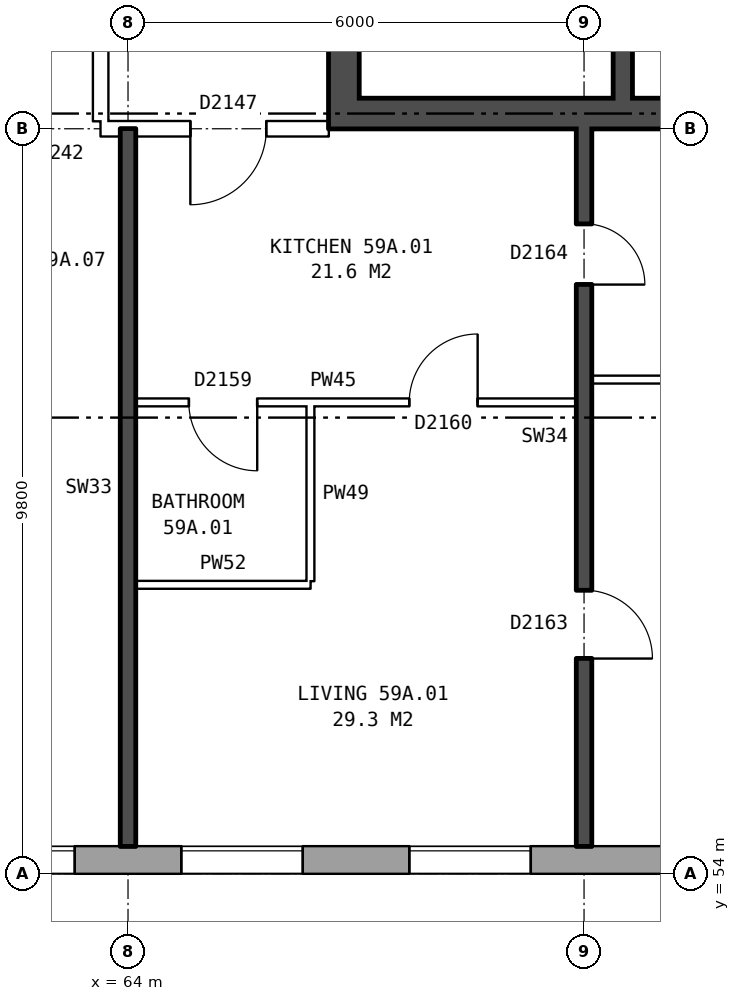
"""IFC4 building model, lengths in metres.
Left out: names, types, materials, properties, quantities, classifications, styles, units other than length and angle.
Written with IfcOpenShell. Run it as: python <this file> out.ifc"""

import sys

from ifc_helpers import new_model, si_unit, direction, frame, frame_2d, origin, place, context, subcontext, project, spatial, rectangle, extrude, element, fill, save


model = new_model("IFC4")
c1 = context("Model", 3, precision=1e-05, world=origin(), true_north=direction((0.0, 1.0)))
c2 = subcontext(c1, "Body", "Model", "MODEL_VIEW")
j1 = project(units=[si_unit("LENGTHUNIT", "METRE"), si_unit("PLANEANGLEUNIT", "RADIAN")], contexts=[c1])
p1 = place(None, origin())
s1 = spatial("IfcSite", under=j1, at=p1, CompositionType="ELEMENT")
p2 = place(p1, origin())
s2 = spatial("IfcBuilding", under=s1, at=p2, CompositionType="ELEMENT")
p3 = place(p2, frame((0.0, 0.0, 209.0)))
s3 = spatial("IfcBuildingStorey", under=s2, at=p3, CompositionType="ELEMENT", Elevation=209.0)
p4 = place(p3, frame((35.075, 54.18, 0.0), z_axis=(0.0, 0.0, 1.0), x_axis=(1.0, 0.0, 0.0)))
e1 = element("IfcWall", 1, at=p4, inside=s3, PredefinedType="STANDARD", context=c2, shape_type="SweptSolid", body=[
    extrude(rectangle(XDim=39.875, YDim=0.36, at=frame_2d((19.938, 0.0))), origin(), (0.0, 0.0, 1.0), 2.85),
])
p5 = place(p4, frame((0.3, 0.0, 0.8)))
e2 = element("IfcOpeningElement", 2, at=p5, cuts=e1, PredefinedType="OPENING", context=c2, shape_type="SweptSolid", body=[
    extrude(rectangle(XDim=1.0, YDim=1.8, at=frame_2d((0.5, 0.9))), frame((0.0, 0.19, 0.0), z_axis=(0.0, -1.0, 0.0), x_axis=(1.0, 0.0, 0.0)), (0.0, 0.0, 1.0), 0.38),
])
p6 = place(p4, frame((5.625, 0.0, 0.8)))
e3 = element("IfcOpeningElement", 3, at=p6, cuts=e1, PredefinedType="OPENING", context=c2, shape_type="SweptSolid", body=[
    extrude(rectangle(XDim=1.6, YDim=1.8, at=frame_2d((0.8, 0.9))), frame((0.0, 0.19, 0.0), z_axis=(0.0, -1.0, 0.0), x_axis=(1.0, 0.0, 0.0)), (0.0, 0.0, 1.0), 0.38),
])
p7 = place(p4, frame((8.625, 0.0, 0.8)))
e4 = element("IfcOpeningElement", 4, at=p7, cuts=e1, PredefinedType="OPENING", context=c2, shape_type="SweptSolid", body=[
    extrude(rectangle(XDim=1.6, YDim=1.8, at=frame_2d((0.8, 0.9))), frame((0.0, 0.19, 0.0), z_axis=(0.0, -1.0, 0.0), x_axis=(1.0, 0.0, 0.0)), (0.0, 0.0, 1.0), 0.38),
])
p8 = place(p4, frame((11.625, 0.0, 0.8)))
e5 = element("IfcOpeningElement", 5, at=p8, cuts=e1, PredefinedType="OPENING", context=c2, shape_type="SweptSolid", body=[
    extrude(rectangle(XDim=1.6, YDim=1.8, at=frame_2d((0.8, 0.9))), frame((0.0, 0.19, 0.0), z_axis=(0.0, -1.0, 0.0), x_axis=(1.0, 0.0, 0.0)), (0.0, 0.0, 1.0), 0.38),
])
p9 = place(p4, frame((14.625, 0.0, 0.8)))
e6 = element("IfcOpeningElement", 6, at=p9, cuts=e1, PredefinedType="OPENING", context=c2, shape_type="SweptSolid", body=[
    extrude(rectangle(XDim=1.6, YDim=1.8, at=frame_2d((0.8, 0.9))), frame((0.0, 0.19, 0.0), z_axis=(0.0, -1.0, 0.0), x_axis=(1.0, 0.0, 0.0)), (0.0, 0.0, 1.0), 0.38),
])
p10 = place(p4, frame((17.625, 0.0, 0.8)))
e7 = element("IfcOpeningElement", 7, at=p10, cuts=e1, PredefinedType="OPENING", context=c2, shape_type="SweptSolid", body=[
    extrude(rectangle(XDim=1.6, YDim=1.8, at=frame_2d((0.8, 0.9))), frame((0.0, 0.19, 0.0), z_axis=(0.0, -1.0, 0.0), x_axis=(1.0, 0.0, 0.0)), (0.0, 0.0, 1.0), 0.38),
])
p11 = place(p4, frame((20.625, 0.0, 0.8)))
e8 = element("IfcOpeningElement", 8, at=p11, cuts=e1, PredefinedType="OPENING", context=c2, shape_type="SweptSolid", body=[
    extrude(rectangle(XDim=1.6, YDim=1.8, at=frame_2d((0.8, 0.9))), frame((0.0, 0.19, 0.0), z_axis=(0.0, -1.0, 0.0), x_axis=(1.0, 0.0, 0.0)), (0.0, 0.0, 1.0), 0.38),
])
p12 = place(p4, frame((23.625, 0.0, 0.8)))
e9 = element("IfcOpeningElement", 9, at=p12, cuts=e1, PredefinedType="OPENING", context=c2, shape_type="SweptSolid", body=[
    extrude(rectangle(XDim=1.6, YDim=1.8, at=frame_2d((0.8, 0.9))), frame((0.0, 0.19, 0.0), z_axis=(0.0, -1.0, 0.0), x_axis=(1.0, 0.0, 0.0)), (0.0, 0.0, 1.0), 0.38),
])
p13 = place(p4, frame((26.625, 0.0, 0.8)))
e10 = element("IfcOpeningElement", 10, at=p13, cuts=e1, PredefinedType="OPENING", context=c2, shape_type="SweptSolid", body=[
    extrude(rectangle(XDim=1.6, YDim=1.8, at=frame_2d((0.8, 0.9))), frame((0.0, 0.19, 0.0), z_axis=(0.0, -1.0, 0.0), x_axis=(1.0, 0.0, 0.0)), (0.0, 0.0, 1.0), 0.38),
])
p14 = place(p4, frame((29.625, 0.0, 0.8)))
e11 = element("IfcOpeningElement", 11, at=p14, cuts=e1, PredefinedType="OPENING", context=c2, shape_type="SweptSolid", body=[
    extrude(rectangle(XDim=1.6, YDim=1.8, at=frame_2d((0.8, 0.9))), frame((0.0, 0.19, 0.0), z_axis=(0.0, -1.0, 0.0), x_axis=(1.0, 0.0, 0.0)), (0.0, 0.0, 1.0), 0.38),
])
p15 = place(p4, frame((32.625, 0.0, 0.8)))
e12 = element("IfcOpeningElement", 12, at=p15, cuts=e1, PredefinedType="OPENING", context=c2, shape_type="SweptSolid", body=[
    extrude(rectangle(XDim=1.6, YDim=1.8, at=frame_2d((0.8, 0.9))), frame((0.0, 0.19, 0.0), z_axis=(0.0, -1.0, 0.0), x_axis=(1.0, 0.0, 0.0)), (0.0, 0.0, 1.0), 0.38),
])
p16 = place(p4, frame((36.325, 0.0, 1.1)))
e13 = element("IfcOpeningElement", 13, at=p16, cuts=e1, PredefinedType="OPENING", context=c2, shape_type="SweptSolid", body=[
    extrude(rectangle(XDim=0.8, YDim=1.5, at=frame_2d((0.4, 0.75))), frame((0.0, 0.19, 0.0), z_axis=(0.0, -1.0, 0.0), x_axis=(1.0, 0.0, 0.0)), (0.0, 0.0, 1.0), 0.38),
])
p17 = place(p4, frame((3.65, 0.0, 0.8)))
e14 = element("IfcOpeningElement", 14, at=p17, cuts=e1, PredefinedType="OPENING", context=c2, shape_type="SweptSolid", body=[
    extrude(rectangle(XDim=1.0, YDim=1.8, at=frame_2d((0.5, 0.9))), frame((0.0, 0.19, 0.0), z_axis=(0.0, -1.0, 0.0), x_axis=(1.0, 0.0, 0.0)), (0.0, 0.0, 1.0), 0.38),
])
p18 = place(p4, frame((37.425, 0.0, 0.8)))
e15 = element("IfcOpeningElement", 15, at=p18, cuts=e1, PredefinedType="OPENING", context=c2, shape_type="SweptSolid", body=[
    extrude(rectangle(XDim=1.4, YDim=1.8, at=frame_2d((0.7, 0.9))), frame((0.0, 0.19, 0.0), z_axis=(0.0, -1.0, 0.0), x_axis=(1.0, 0.0, 0.0)), (0.0, 0.0, 1.0), 0.38),
])
p19 = place(p3, frame((66.84, 63.8, 0.0), z_axis=(0.0, 0.0, 1.0), x_axis=(0.0, 1.0, 0.0)))
e16 = element("IfcWall", 16, at=p19, inside=s3, PredefinedType="SHEAR", context=c2, shape_type="SweptSolid", body=[
    extrude(rectangle(XDim=12.4, YDim=0.4, at=frame_2d((6.2, 0.0))), origin(), (0.0, 0.0, 1.0), 2.85),
])
p20 = place(p19, frame((1.325, 0.0, 0.0)))
e17 = element("IfcOpeningElement", 17, at=p20, cuts=e16, PredefinedType="OPENING", context=c2, shape_type="SweptSolid", body=[
    extrude(rectangle(XDim=1.1, YDim=2.1, at=frame_2d((0.55, 1.05))), frame((0.0, 0.21, 0.0), z_axis=(0.0, -1.0, 0.0), x_axis=(1.0, 0.0, 0.0)), (0.0, 0.0, 1.0), 0.42),
])
p21 = place(p19, frame((3.6, 0.0, 0.0)))
e18 = element("IfcOpeningElement", 18, at=p21, cuts=e16, PredefinedType="OPENING", context=c2, shape_type="SweptSolid", body=[
    extrude(rectangle(XDim=1.1, YDim=2.1, at=frame_2d((0.55, 1.05))), frame((0.0, 0.21, 0.0), z_axis=(0.0, -1.0, 0.0), x_axis=(1.0, 0.0, 0.0)), (0.0, 0.0, 1.0), 0.42),
])
p22 = place(p19, frame((5.8, 0.0, 0.0)))
e19 = element("IfcOpeningElement", 19, at=p22, cuts=e16, PredefinedType="OPENING", context=c2, shape_type="SweptSolid", body=[
    extrude(rectangle(XDim=1.1, YDim=2.1, at=frame_2d((0.55, 1.05))), frame((0.0, 0.21, 0.0), z_axis=(0.0, -1.0, 0.0), x_axis=(1.0, 0.0, 0.0)), (0.0, 0.0, 1.0), 0.42),
])
p23 = place(p19, frame((8.0, 0.0, 0.0)))
e20 = element("IfcOpeningElement", 20, at=p23, cuts=e16, PredefinedType="OPENING", context=c2, shape_type="SweptSolid", body=[
    extrude(rectangle(XDim=1.1, YDim=2.1, at=frame_2d((0.55, 1.05))), frame((0.0, 0.21, 0.0), z_axis=(0.0, -1.0, 0.0), x_axis=(1.0, 0.0, 0.0)), (0.0, 0.0, 1.0), 0.42),
])
p24 = place(p19, frame((9.9, 0.0, 0.0)))
e21 = element("IfcOpeningElement", 21, at=p24, cuts=e16, PredefinedType="OPENING", context=c2, shape_type="SweptSolid", body=[
    extrude(rectangle(XDim=1.1, YDim=2.1, at=frame_2d((0.55, 1.05))), frame((0.0, 0.21, 0.0), z_axis=(0.0, -1.0, 0.0), x_axis=(1.0, 0.0, 0.0)), (0.0, 0.0, 1.0), 0.42),
])
p25 = place(p3, frame((67.04, 64.0, 0.0), z_axis=(0.0, 0.0, 1.0), x_axis=(1.0, 0.0, 0.0)))
e22 = element("IfcWall", 22, at=p25, inside=s3, PredefinedType="SHEAR", context=c2, shape_type="SweptSolid", body=[
    extrude(rectangle(XDim=8.2, YDim=0.4, at=frame_2d((4.1, 0.0))), origin(), (0.0, 0.0, 1.0), 2.85),
])
p26 = place(p3, frame((70.51, 64.2, 0.0), z_axis=(0.0, 0.0, 1.0), x_axis=(0.0, 1.0, 0.0)))
e23 = element("IfcWall", 23, at=p26, inside=s3, PredefinedType="SHEAR", context=c2, shape_type="SweptSolid", body=[
    extrude(rectangle(XDim=2.525, YDim=0.25, at=frame_2d((1.263, 0.0))), origin(), (0.0, 0.0, 1.0), 2.85),
])
p27 = place(p3, frame((63.64, 63.9, 0.0), z_axis=(0.0, 0.0, 1.0), x_axis=(0.0, 1.0, 0.0)))
e24 = element("IfcWall", 24, at=p27, inside=s3, PredefinedType="PARTITIONING", context=c2, shape_type="SweptSolid", body=[
    extrude(rectangle(XDim=12.2, YDim=0.2, at=frame_2d((6.1, 0.0))), origin(), (0.0, 0.0, 1.0), 2.85),
])
p28 = place(p27, frame((5.1, 0.0, 0.0)))
e25 = element("IfcOpeningElement", 25, at=p28, cuts=e24, PredefinedType="OPENING", context=c2, shape_type="SweptSolid", body=[
    extrude(rectangle(XDim=2.0, YDim=2.1, at=frame_2d((1.0, 1.05))), frame((0.0, 0.11, 0.0), z_axis=(0.0, -1.0, 0.0), x_axis=(1.0, 0.0, 0.0)), (0.0, 0.0, 1.0), 0.22),
])
p29 = place(p3, frame((64.1, 57.8, 0.0), z_axis=(0.0, 0.0, 1.0), x_axis=(1.0, 0.0, 0.0)))
e26 = element("IfcWall", 26, at=p29, inside=s3, PredefinedType="PARTITIONING", context=c2, shape_type="SweptSolid", body=[
    extrude(rectangle(XDim=2.3, YDim=0.1, at=frame_2d((1.15, 0.0))), origin(), (0.0, 0.0, 1.0), 2.85),
])
p30 = place(p3, frame((64.1, 60.2, 0.0), z_axis=(0.0, 0.0, 1.0), x_axis=(1.0, 0.0, 0.0)))
e27 = element("IfcWall", 27, at=p30, inside=s3, PredefinedType="PARTITIONING", context=c2, shape_type="SweptSolid", body=[
    extrude(rectangle(XDim=5.8, YDim=0.1, at=frame_2d((2.9, 0.0))), origin(), (0.0, 0.0, 1.0), 2.85),
])
p31 = place(p30, frame((3.6, 0.0, 0.0)))
e28 = element("IfcOpeningElement", 28, at=p31, cuts=e27, PredefinedType="OPENING", context=c2, shape_type="SweptSolid", body=[
    extrude(rectangle(XDim=0.9, YDim=2.1, at=frame_2d((0.45, 1.05))), frame((0.0, 0.06, 0.0), z_axis=(0.0, -1.0, 0.0), x_axis=(1.0, 0.0, 0.0)), (0.0, 0.0, 1.0), 0.12),
])
p32 = place(p30, frame((0.7, 0.0, 0.0)))
e29 = element("IfcOpeningElement", 29, at=p32, cuts=e27, PredefinedType="OPENING", context=c2, shape_type="SweptSolid", body=[
    extrude(rectangle(XDim=0.9, YDim=2.1, at=frame_2d((0.45, 1.05))), frame((0.0, 0.06, 0.0), z_axis=(0.0, -1.0, 0.0), x_axis=(1.0, 0.0, 0.0)), (0.0, 0.0, 1.0), 0.12),
])
p33 = place(p3, frame((70.1, 60.5, 0.0), z_axis=(0.0, 0.0, 1.0), x_axis=(1.0, 0.0, 0.0)))
e30 = element("IfcWall", 30, at=p33, inside=s3, PredefinedType="PARTITIONING", context=c2, shape_type="SweptSolid", body=[
    extrude(rectangle(XDim=5.8, YDim=0.1, at=frame_2d((2.9, 0.0))), origin(), (0.0, 0.0, 1.0), 2.85),
])
p34 = place(p3, frame((63.64, 63.8, 0.0), z_axis=(0.0, 0.0, 1.0), x_axis=(1.0, 0.0, 0.0)))
e31 = element("IfcWall", 31, at=p34, inside=s3, PredefinedType="PARTITIONING", context=c2, shape_type="SweptSolid", body=[
    extrude(rectangle(XDim=3.0, YDim=0.2, at=frame_2d((1.5, 0.0))), origin(), (0.0, 0.0, 1.0), 2.85),
])
p35 = place(p34, frame((1.18, 0.0, 0.0)))
e32 = element("IfcOpeningElement", 32, at=p35, cuts=e31, PredefinedType="OPENING", context=c2, shape_type="SweptSolid", body=[
    extrude(rectangle(XDim=1.0, YDim=2.1, at=frame_2d((0.5, 1.05))), frame((0.0, 0.11, 0.0), z_axis=(0.0, -1.0, 0.0), x_axis=(1.0, 0.0, 0.0)), (0.0, 0.0, 1.0), 0.22),
])
p36 = place(p3, frame((64.0, 54.36, 0.0), z_axis=(0.0, 0.0, 1.0), x_axis=(0.0, 1.0, 0.0)))
e33 = element("IfcWall", 33, at=p36, inside=s3, PredefinedType="SOLIDWALL", context=c2, shape_type="SweptSolid", body=[
    extrude(rectangle(XDim=9.44, YDim=0.2, at=frame_2d((4.72, 0.0))), origin(), (0.0, 0.0, 1.0), 2.85),
])
p37 = place(p3, frame((66.4, 57.85, 0.0), z_axis=(0.0, 0.0, 1.0), x_axis=(0.0, 1.0, 0.0)))
e34 = element("IfcWall", 34, at=p37, inside=s3, PredefinedType="PARTITIONING", context=c2, shape_type="SweptSolid", body=[
    extrude(rectangle(XDim=2.3, YDim=0.1, at=frame_2d((1.15, 0.0))), origin(), (0.0, 0.0, 1.0), 2.85),
])
p38 = place(p3, frame((70.0, 54.36, 0.0), z_axis=(0.0, 0.0, 1.0), x_axis=(0.0, 1.0, 0.0)))
e35 = element("IfcWall", 35, at=p38, inside=s3, PredefinedType="SOLIDWALL", context=c2, shape_type="SweptSolid", body=[
    extrude(rectangle(XDim=9.44, YDim=0.2, at=frame_2d((4.72, 0.0))), origin(), (0.0, 0.0, 1.0), 2.85),
])
p39 = place(p38, frame((2.47, 0.0, 0.0)))
e36 = element("IfcOpeningElement", 36, at=p39, cuts=e35, PredefinedType="OPENING", context=c2, shape_type="SweptSolid", body=[
    extrude(rectangle(XDim=0.9, YDim=2.1, at=frame_2d((0.45, 1.05))), frame((0.0, 0.11, 0.0), z_axis=(0.0, -1.0, 0.0), x_axis=(1.0, 0.0, 0.0)), (0.0, 0.0, 1.0), 0.22),
])
p40 = place(p38, frame((7.39, 0.0, 0.0)))
e37 = element("IfcOpeningElement", 37, at=p40, cuts=e35, PredefinedType="OPENING", context=c2, shape_type="SweptSolid", body=[
    extrude(rectangle(XDim=0.8, YDim=2.1, at=frame_2d((0.4, 1.05))), frame((0.0, 0.11, 0.0), z_axis=(0.0, -1.0, 0.0), x_axis=(1.0, 0.0, 0.0)), (0.0, 0.0, 1.0), 0.22),
])
p41 = place(p13, origin())
e38 = element("IfcWindow", 38, at=p41, inside=s3, PartitioningType="SINGLE_PANEL", PredefinedType="WINDOW", context=c2, shape_type="SweptSolid", body=[
    extrude(rectangle(XDim=1.6, YDim=1.8, at=frame_2d((0.8, 0.9))), frame((0.0, 0.15, 0.0), z_axis=(0.0, -1.0, 0.0), x_axis=(1.0, 0.0, 0.0)), (0.0, 0.0, 1.0), 0.06),
])
fill(e10, e38)
p42 = place(p14, origin())
e39 = element("IfcWindow", 39, at=p42, inside=s3, PartitioningType="SINGLE_PANEL", PredefinedType="WINDOW", context=c2, shape_type="SweptSolid", body=[
    extrude(rectangle(XDim=1.6, YDim=1.8, at=frame_2d((0.8, 0.9))), frame((0.0, 0.15, 0.0), z_axis=(0.0, -1.0, 0.0), x_axis=(1.0, 0.0, 0.0)), (0.0, 0.0, 1.0), 0.06),
])
fill(e11, e39)
p43 = place(p15, origin())
e40 = element("IfcWindow", 40, at=p43, inside=s3, PartitioningType="SINGLE_PANEL", PredefinedType="WINDOW", context=c2, shape_type="SweptSolid", body=[
    extrude(rectangle(XDim=1.6, YDim=1.8, at=frame_2d((0.8, 0.9))), frame((0.0, 0.15, 0.0), z_axis=(0.0, -1.0, 0.0), x_axis=(1.0, 0.0, 0.0)), (0.0, 0.0, 1.0), 0.06),
])
fill(e12, e40)
p44 = place(p39, frame((0.9, 0.0, 0.0), z_axis=(0.0, 0.0, 1.0), x_axis=(-1.0, 0.0, 0.0)))
e41 = element("IfcDoor", 41, at=p44, inside=s3, OperationType="SINGLE_SWING_RIGHT", PredefinedType="DOOR", context=c2, shape_type="SweptSolid", body=[
    extrude(rectangle(XDim=0.9, YDim=2.1, at=frame_2d((0.45, 1.05))), frame((0.0, 0.025, 0.0), z_axis=(0.0, -1.0, 0.0), x_axis=(1.0, 0.0, 0.0)), (0.0, 0.0, 1.0), 0.05),
])
fill(e36, e41)
p45 = place(p35, frame((1.0, 0.0, 0.0), z_axis=(0.0, 0.0, 1.0), x_axis=(-1.0, 0.0, 0.0)))
e42 = element("IfcDoor", 42, at=p45, inside=s3, OperationType="SINGLE_SWING_RIGHT", PredefinedType="DOOR", context=c2, shape_type="SweptSolid", body=[
    extrude(rectangle(XDim=1.0, YDim=2.1, at=frame_2d((0.5, 1.05))), frame((0.0, 0.025, 0.0), z_axis=(0.0, -1.0, 0.0), x_axis=(1.0, 0.0, 0.0)), (0.0, 0.0, 1.0), 0.05),
])
fill(e32, e42)
p46 = place(p31, origin())
e43 = element("IfcDoor", 43, at=p46, inside=s3, OperationType="SINGLE_SWING_RIGHT", PredefinedType="DOOR", context=c2, shape_type="SweptSolid", body=[
    extrude(rectangle(XDim=0.9, YDim=2.1, at=frame_2d((0.45, 1.05))), frame((0.0, 0.025, 0.0), z_axis=(0.0, -1.0, 0.0), x_axis=(1.0, 0.0, 0.0)), (0.0, 0.0, 1.0), 0.05),
])
fill(e28, e43)
p47 = place(p40, frame((0.8, 0.0, 0.0), z_axis=(0.0, 0.0, 1.0), x_axis=(-1.0, 0.0, 0.0)))
e44 = element("IfcDoor", 44, at=p47, inside=s3, OperationType="SINGLE_SWING_RIGHT", PredefinedType="DOOR", context=c2, shape_type="SweptSolid", body=[
    extrude(rectangle(XDim=0.8, YDim=2.1, at=frame_2d((0.4, 1.05))), frame((0.0, 0.025, 0.0), z_axis=(0.0, -1.0, 0.0), x_axis=(1.0, 0.0, 0.0)), (0.0, 0.0, 1.0), 0.05),
])
fill(e37, e44)
p48 = place(p32, frame((0.9, 0.0, 0.0), z_axis=(0.0, 0.0, 1.0), x_axis=(-1.0, 0.0, 0.0)))
e45 = element("IfcDoor", 45, at=p48, inside=s3, OperationType="SINGLE_SWING_LEFT", PredefinedType="DOOR", context=c2, shape_type="SweptSolid", body=[
    extrude(rectangle(XDim=0.9, YDim=2.1, at=frame_2d((0.45, 1.05))), frame((0.0, 0.025, 0.0), z_axis=(0.0, -1.0, 0.0), x_axis=(1.0, 0.0, 0.0)), (0.0, 0.0, 1.0), 0.05),
])
fill(e29, e45)
save(model, sys.argv[1])
